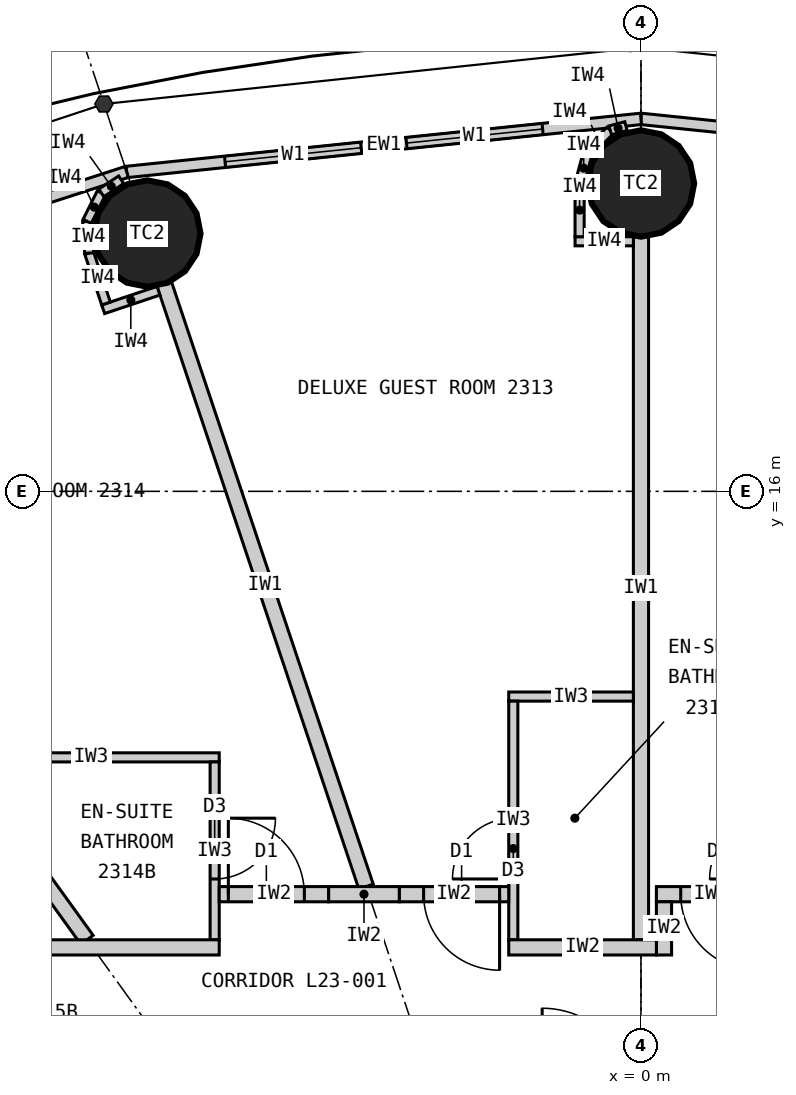
"""IFC4 building model, lengths in metres.
Left out: names, types, materials, properties, quantities, classifications, styles, units other than length and angle.
Written with IfcOpenShell. Run it as: python <this file> out.ifc"""

import sys

from ifc_helpers import new_model, si_unit, direction, frame, frame_2d, origin, origin_2d, place, context, subcontext, project, spatial, rectangle, circle, extrude, clip, halfspace, element, fill, save


model = new_model("IFC4")
c1 = context("Model", 3, precision=1e-05, world=origin(), true_north=direction((0.0, 1.0)))
c2 = subcontext(c1, "Body", "Model", "MODEL_VIEW")
j1 = project(units=[si_unit("LENGTHUNIT", "METRE"), si_unit("PLANEANGLEUNIT", "RADIAN")], contexts=[c1])
p1 = place(None, origin())
s1 = spatial("IfcSite", under=j1, at=p1, CompositionType="ELEMENT")
p2 = place(p1, origin())
s2 = spatial("IfcBuilding", under=s1, at=p2, CompositionType="ELEMENT")
p3 = place(p2, frame((0.0, 0.0, 90.3)))
s3 = spatial("IfcBuildingStorey", under=s2, at=p3, CompositionType="ELEMENT", Elevation=90.3)
for number, where, z_axis, x_axis in (
    (1, (0.0, 20.05, 0.0), (0.0, 0.0, 1.0), (1.0, 0.0, 0.0)),
    (2, (-6.495, 19.391, 0.0), (0.0, 0.0, 1.0), (1.0, 0.0, 0.0)),
):
    element("IfcColumn", number, at=place(p3, frame(where, z_axis=z_axis, x_axis=x_axis)), inside=s3, PredefinedType="COLUMN", context=c2, shape_type="Clipping", body=[
        clip(extrude(circle(Radius=0.7, at=origin_2d()), origin(), (0.0, 0.0, 1.0), 3.3), halfspace(frame((0.0, 0.0, 2.25), z_axis=(0.0, 0.0, 1.0), x_axis=(1.0, 0.0, 0.0)), False)),
    ])
p4 = place(p3, frame((6.766, 20.202, 0.0), z_axis=(0.0, 0.0, 1.0), x_axis=(-0.994721394369, 0.102612609291, 0.0)))
e3 = element("IfcWall", 3, at=p4, inside=s3, PredefinedType="ELEMENTEDWALL", context=c2, shape_type="SweptSolid", body=[
    extrude(rectangle(XDim=6.802, YDim=0.15, at=frame_2d((3.401, 0.0))), origin(), (0.0, 0.0, 1.0), 3.05),
])
p5 = place(p4, frame((1.301, 0.0, 0.9)))
e4 = element("IfcOpeningElement", 4, at=p5, cuts=e3, PredefinedType="OPENING", context=c2, shape_type="SweptSolid", body=[
    extrude(rectangle(XDim=1.8, YDim=1.9, at=frame_2d((0.9, 0.95))), frame((0.0, 0.085, 0.0), z_axis=(0.0, -1.0, 0.0), x_axis=(1.0, 0.0, 0.0)), (0.0, 0.0, 1.0), 0.17),
])
p6 = place(p4, frame((3.701, 0.0, 0.9)))
e5 = element("IfcOpeningElement", 5, at=p6, cuts=e3, PredefinedType="OPENING", context=c2, shape_type="SweptSolid", body=[
    extrude(rectangle(XDim=1.8, YDim=1.9, at=frame_2d((0.9, 0.95))), frame((0.0, 0.085, 0.0), z_axis=(0.0, -1.0, 0.0), x_axis=(1.0, 0.0, 0.0)), (0.0, 0.0, 1.0), 0.17),
])
p7 = place(p3, frame((0.0, 20.9, 0.0), z_axis=(0.0, 0.0, 1.0), x_axis=(-0.994721394369, -0.102612609291, 0.0)))
e6 = element("IfcWall", 6, at=p7, inside=s3, PredefinedType="ELEMENTEDWALL", context=c2, shape_type="SweptSolid", body=[
    extrude(rectangle(XDim=6.802, YDim=0.15, at=frame_2d((3.401, 0.0))), origin(), (0.0, 0.0, 1.0), 3.05),
])
p8 = place(p7, frame((1.301, 0.0, 0.9)))
e7 = element("IfcOpeningElement", 7, at=p8, cuts=e6, PredefinedType="OPENING", context=c2, shape_type="SweptSolid", body=[
    extrude(rectangle(XDim=1.8, YDim=1.9, at=frame_2d((0.9, 0.95))), frame((0.0, 0.085, 0.0), z_axis=(0.0, -1.0, 0.0), x_axis=(1.0, 0.0, 0.0)), (0.0, 0.0, 1.0), 0.17),
])
p9 = place(p7, frame((3.701, 0.0, 0.9)))
e8 = element("IfcOpeningElement", 8, at=p9, cuts=e6, PredefinedType="OPENING", context=c2, shape_type="SweptSolid", body=[
    extrude(rectangle(XDim=1.8, YDim=1.9, at=frame_2d((0.9, 0.95))), frame((0.0, 0.085, 0.0), z_axis=(0.0, -1.0, 0.0), x_axis=(1.0, 0.0, 0.0)), (0.0, 0.0, 1.0), 0.17),
])
p10 = place(p3, frame((-6.766, 20.202, 0.0), z_axis=(0.0, 0.0, 1.0), x_axis=(-0.951137534625, -0.308767534285, 0.0)))
e9 = element("IfcWall", 9, at=p10, inside=s3, PredefinedType="ELEMENTEDWALL", context=c2, shape_type="SweptSolid", body=[
    extrude(rectangle(XDim=6.655, YDim=0.15, at=frame_2d((3.328, 0.0))), origin(), (0.0, 0.0, 1.0), 3.05),
])
p11 = place(p10, frame((1.228, 0.0, 0.9)))
e10 = element("IfcOpeningElement", 10, at=p11, cuts=e9, PredefinedType="OPENING", context=c2, shape_type="SweptSolid", body=[
    extrude(rectangle(XDim=1.8, YDim=1.9, at=frame_2d((0.9, 0.95))), frame((0.0, 0.085, 0.0), z_axis=(0.0, -1.0, 0.0), x_axis=(1.0, 0.0, 0.0)), (0.0, 0.0, 1.0), 0.17),
])
p12 = place(p10, frame((3.628, 0.0, 0.9)))
e11 = element("IfcOpeningElement", 11, at=p12, cuts=e9, PredefinedType="OPENING", context=c2, shape_type="SweptSolid", body=[
    extrude(rectangle(XDim=1.8, YDim=1.9, at=frame_2d((0.9, 0.95))), frame((0.0, 0.085, 0.0), z_axis=(0.0, -1.0, 0.0), x_axis=(1.0, 0.0, 0.0)), (0.0, 0.0, 1.0), 0.17),
])
p13 = place(p3, frame((0.0, 10.1, 0.0), z_axis=(0.0, 0.0, 1.0), x_axis=(0.0, 1.0, 0.0)))
e12 = element("IfcWall", 12, at=p13, inside=s3, PredefinedType="PARTITIONING", context=c2, shape_type="SweptSolid", body=[
    extrude(rectangle(XDim=9.25, YDim=0.2, at=frame_2d((4.625, 0.0))), origin(), (0.0, 0.0, 1.0), 2.25),
])
p14 = place(p3, frame((-3.617, 10.8, 0.0), z_axis=(0.0, 0.0, 1.0), x_axis=(-0.317576599239, 0.948232621046, 0.0)))
e13 = element("IfcWall", 13, at=p14, inside=s3, PredefinedType="PARTITIONING", context=c2, shape_type="SweptSolid", body=[
    extrude(rectangle(XDim=8.36, YDim=0.2, at=frame_2d((4.18, 0.0))), origin(), (0.0, 0.0, 1.0), 2.15),
])
p15 = place(p3, frame((-7.289, 10.1, 0.0), z_axis=(0.0, 0.0, 1.0), x_axis=(-0.585198353053, 0.810890182197, 0.0)))
e14 = element("IfcWall", 14, at=p15, inside=s3, PredefinedType="PARTITIONING", context=c2, shape_type="SweptSolid", body=[
    extrude(rectangle(XDim=8.36, YDim=0.2, at=frame_2d((4.18, 0.0))), origin(), (0.0, 0.0, 1.0), 2.15),
])
p16 = place(p3, frame((-0.1, 13.3, 0.0), z_axis=(0.0, 0.0, 1.0), x_axis=(-1.0, 0.0, 0.0)))
e15 = element("IfcWall", 15, at=p16, inside=s3, PredefinedType="PARTITIONING", context=c2, shape_type="SweptSolid", body=[
    extrude(rectangle(XDim=1.64, YDim=0.12, at=frame_2d((0.82, 0.0))), origin(), (0.0, 0.0, 1.0), 3.05),
])
p17 = place(p3, frame((-1.68, 10.1, 0.0), z_axis=(0.0, 0.0, 1.0), x_axis=(0.0, 1.0, 0.0)))
e16 = element("IfcWall", 16, at=p17, inside=s3, PredefinedType="PARTITIONING", context=c2, shape_type="SweptSolid", body=[
    extrude(rectangle(XDim=3.14, YDim=0.12, at=frame_2d((1.57, 0.0))), origin(), (0.0, 0.0, 1.0), 3.05),
])
p18 = place(p17, frame((0.8, 0.0, 0.0)))
e17 = element("IfcOpeningElement", 17, at=p18, cuts=e16, PredefinedType="OPENING", context=c2, shape_type="SweptSolid", body=[
    extrude(rectangle(XDim=0.8, YDim=2.1, at=frame_2d((0.4, 1.05))), frame((0.0, 0.07, 0.0), z_axis=(0.0, -1.0, 0.0), x_axis=(1.0, 0.0, 0.0)), (0.0, 0.0, 1.0), 0.14),
])
p19 = place(p3, frame((-8.921, 12.5, 0.0), z_axis=(0.0, 0.0, 1.0), x_axis=(1.0, 0.0, 0.0)))
e18 = element("IfcWall", 18, at=p19, inside=s3, PredefinedType="PARTITIONING", context=c2, shape_type="SweptSolid", body=[
    extrude(rectangle(XDim=3.372, YDim=0.12, at=frame_2d((1.686, 0.0))), origin(), (0.0, 0.0, 1.0), 3.05),
])
p20 = place(p3, frame((-5.609, 10.1, 0.0), z_axis=(0.0, 0.0, 1.0), x_axis=(0.0, 1.0, 0.0)))
e19 = element("IfcWall", 19, at=p20, inside=s3, PredefinedType="PARTITIONING", context=c2, shape_type="SweptSolid", body=[
    extrude(rectangle(XDim=2.34, YDim=0.12, at=frame_2d((1.17, 0.0))), origin(), (0.0, 0.0, 1.0), 3.05),
])
p21 = place(p20, frame((0.8, 0.0, 0.0)))
e20 = element("IfcOpeningElement", 20, at=p21, cuts=e19, PredefinedType="OPENING", context=c2, shape_type="SweptSolid", body=[
    extrude(rectangle(XDim=0.8, YDim=2.1, at=frame_2d((0.4, 1.05))), frame((0.0, 0.07, 0.0), z_axis=(0.0, -1.0, 0.0), x_axis=(1.0, 0.0, 0.0)), (0.0, 0.0, 1.0), 0.14),
])
p22 = place(p3, frame((0.203, 10.7, 0.0), z_axis=(0.0, 0.0, 1.0), x_axis=(1.0, 0.0, 0.0)))
e21 = element("IfcWall", 21, at=p22, inside=s3, PredefinedType="PARTITIONING", context=c2, shape_type="SweptSolid", body=[
    extrude(rectangle(XDim=1.44, YDim=0.2, at=frame_2d((0.72, 0.0))), origin(), (0.0, 0.0, 1.0), 3.05),
])
p23 = place(p22, frame((0.32, 0.0, 0.0)))
e22 = element("IfcOpeningElement", 22, at=p23, cuts=e21, PredefinedType="OPENING", context=c2, shape_type="SweptSolid", body=[
    extrude(rectangle(XDim=1.0, YDim=2.2, at=frame_2d((0.5, 1.1))), frame((0.0, 0.11, 0.0), z_axis=(0.0, -1.0, 0.0), x_axis=(1.0, 0.0, 0.0)), (0.0, 0.0, 1.0), 0.22),
])
p24 = place(p3, frame((0.303, 9.9, 0.0), z_axis=(0.0, 0.0, 1.0), x_axis=(0.0, 1.0, 0.0)))
e23 = element("IfcWall", 23, at=p24, inside=s3, PredefinedType="PARTITIONING", context=c2, shape_type="SweptSolid", body=[
    extrude(rectangle(XDim=0.7, YDim=0.2, at=frame_2d((0.35, 0.0))), origin(), (0.0, 0.0, 1.0), 3.05),
])
p25 = place(p3, frame((-3.18, 10.7, 0.0), z_axis=(0.0, 0.0, 1.0), x_axis=(1.0, 0.0, 0.0)))
e24 = element("IfcWall", 24, at=p25, inside=s3, PredefinedType="PARTITIONING", context=c2, shape_type="SweptSolid", body=[
    extrude(rectangle(XDim=1.44, YDim=0.2, at=frame_2d((0.72, 0.0))), origin(), (0.0, 0.0, 1.0), 3.05),
])
p26 = place(p25, frame((0.32, 0.0, 0.0)))
e25 = element("IfcOpeningElement", 25, at=p26, cuts=e24, PredefinedType="OPENING", context=c2, shape_type="SweptSolid", body=[
    extrude(rectangle(XDim=1.0, YDim=2.2, at=frame_2d((0.5, 1.1))), frame((0.0, 0.11, 0.0), z_axis=(0.0, -1.0, 0.0), x_axis=(1.0, 0.0, 0.0)), (0.0, 0.0, 1.0), 0.22),
])
p27 = place(p3, frame((-5.549, 10.7, 0.0), z_axis=(0.0, 0.0, 1.0), x_axis=(1.0, 0.0, 0.0)))
e26 = element("IfcWall", 26, at=p27, inside=s3, PredefinedType="PARTITIONING", context=c2, shape_type="SweptSolid", body=[
    extrude(rectangle(XDim=1.44, YDim=0.2, at=frame_2d((0.72, 0.0))), origin(), (0.0, 0.0, 1.0), 3.05),
])
p28 = place(p27, frame((0.12, 0.0, 0.0)))
e27 = element("IfcOpeningElement", 27, at=p28, cuts=e26, PredefinedType="OPENING", context=c2, shape_type="SweptSolid", body=[
    extrude(rectangle(XDim=1.0, YDim=2.2, at=frame_2d((0.5, 1.1))), frame((0.0, 0.11, 0.0), z_axis=(0.0, -1.0, 0.0), x_axis=(1.0, 0.0, 0.0)), (0.0, 0.0, 1.0), 0.22),
])
p29 = place(p3, frame((-4.109, 10.7, 0.0), z_axis=(0.0, 0.0, 1.0), x_axis=(1.0, 0.0, 0.0)))
e28 = element("IfcWall", 28, at=p29, inside=s3, PredefinedType="PARTITIONING", context=c2, shape_type="SweptSolid", body=[
    extrude(rectangle(XDim=0.929, YDim=0.2, at=frame_2d((0.465, 0.0))), origin(), (0.0, 0.0, 1.0), 3.05),
])
p30 = place(p3, frame((-10.179, 10.0, 0.0), z_axis=(0.0, 0.0, 1.0), x_axis=(1.0, 0.0, 0.0)))
e29 = element("IfcWall", 29, at=p30, inside=s3, PredefinedType="PARTITIONING", context=c2, shape_type="SweptSolid", body=[
    extrude(rectangle(XDim=4.63, YDim=0.2, at=frame_2d((2.315, 0.0))), origin(), (0.0, 0.0, 1.0), 3.05),
])
p31 = place(p3, frame((-1.74, 10.0, 0.0), z_axis=(0.0, 0.0, 1.0), x_axis=(1.0, 0.0, 0.0)))
e30 = element("IfcWall", 30, at=p31, inside=s3, PredefinedType="PARTITIONING", context=c2, shape_type="SweptSolid", body=[
    extrude(rectangle(XDim=1.943, YDim=0.2, at=frame_2d((0.971, 0.0))), origin(), (0.0, 0.0, 1.0), 3.05),
])
p32 = place(p3, frame((-0.1, 19.29, 0.0), z_axis=(0.0, 0.0, 1.0), x_axis=(-1.0, 0.0, 0.0)))
e31 = element("IfcWall", 31, at=p32, inside=s3, PredefinedType="PARTITIONING", context=c2, shape_type="SweptSolid", body=[
    extrude(rectangle(XDim=0.767, YDim=0.12, at=frame_2d((0.384, 0.0))), origin(), (0.0, 0.0, 1.0), 3.05),
])
p33 = place(p3, frame((-0.808, 19.35, 0.0), z_axis=(0.0, 0.0, 1.0), x_axis=(0.0, 1.0, 0.0)))
e32 = element("IfcWall", 32, at=p33, inside=s3, PredefinedType="PARTITIONING", context=c2, shape_type="SweptSolid", body=[
    extrude(rectangle(XDim=0.7, YDim=0.12, at=frame_2d((0.35, 0.0))), origin(), (0.0, 0.0, 1.0), 3.05),
])
p34 = place(p3, frame((-0.808, 20.05, 0.0), z_axis=(0.0, 0.0, 1.0), x_axis=(0.2592614205, 0.965807183573, 0.0)))
e33 = element("IfcWall", 33, at=p34, inside=s3, PredefinedType="PARTITIONING", context=c2, shape_type="SweptSolid", body=[
    extrude(rectangle(XDim=0.418, YDim=0.12, at=frame_2d((0.209, 0.0))), origin(), (0.0, 0.0, 1.0), 3.05),
])
p35 = place(p3, frame((-0.699, 20.454, 0.0), z_axis=(0.0, 0.0, 1.0), x_axis=(0.707106781187, 0.707106781187, 0.0)))
e34 = element("IfcWall", 34, at=p35, inside=s3, PredefinedType="PARTITIONING", context=c2, shape_type="SweptSolid", body=[
    extrude(rectangle(XDim=0.418, YDim=0.12, at=frame_2d((0.209, 0.0))), origin(), (0.0, 0.0, 1.0), 3.05),
])
p36 = place(p3, frame((-0.404, 20.749, 0.0), z_axis=(0.0, 0.0, 1.0), x_axis=(0.965759066438, 0.25944060128, 0.0)))
e35 = element("IfcWall", 35, at=p36, inside=s3, PredefinedType="PARTITIONING", context=c2, shape_type="SweptSolid", body=[
    extrude(rectangle(XDim=0.214, YDim=0.12, at=frame_2d((0.107, 0.0))), origin(), (0.0, 0.0, 1.0), 3.05),
])
p37 = place(p3, frame((-6.348, 18.639, 0.0), z_axis=(0.0, 0.0, 1.0), x_axis=(-0.948268951266, -0.317468102437, 0.0)))
e36 = element("IfcWall", 36, at=p37, inside=s3, PredefinedType="PARTITIONING", context=c2, shape_type="SweptSolid", body=[
    extrude(rectangle(XDim=0.768, YDim=0.12, at=frame_2d((0.384, 0.0))), origin(), (0.0, 0.0, 1.0), 3.05),
])
p38 = place(p3, frame((-7.038, 18.471, 0.0), z_axis=(0.0, 0.0, 1.0), x_axis=(-0.317378466199, 0.9482989556, 0.0)))
e37 = element("IfcWall", 37, at=p38, inside=s3, PredefinedType="PARTITIONING", context=c2, shape_type="SweptSolid", body=[
    extrude(rectangle(XDim=0.7, YDim=0.12, at=frame_2d((0.35, 0.0))), origin(), (0.0, 0.0, 1.0), 3.05),
])
p39 = place(p3, frame((-7.26, 19.135, 0.0), z_axis=(0.0, 0.0, 1.0), x_axis=(-0.0613238046, 0.99811792439, 0.0)))
e38 = element("IfcWall", 38, at=p39, inside=s3, PredefinedType="PARTITIONING", context=c2, shape_type="SweptSolid", body=[
    extrude(rectangle(XDim=0.418, YDim=0.12, at=frame_2d((0.209, 0.0))), origin(), (0.0, 0.0, 1.0), 3.05),
])
p40 = place(p3, frame((-7.286, 19.552, 0.0), z_axis=(0.0, 0.0, 1.0), x_axis=(0.445810757773, 0.89512723579, 0.0)))
e39 = element("IfcWall", 39, at=p40, inside=s3, PredefinedType="PARTITIONING", context=c2, shape_type="SweptSolid", body=[
    extrude(rectangle(XDim=0.418, YDim=0.12, at=frame_2d((0.209, 0.0))), origin(), (0.0, 0.0, 1.0), 3.05),
])
p41 = place(p3, frame((-7.1, 19.926, 0.0), z_axis=(0.0, 0.0, 1.0), x_axis=(0.833488262509, 0.552537162787, 0.0)))
e40 = element("IfcWall", 40, at=p41, inside=s3, PredefinedType="PARTITIONING", context=c2, shape_type="SweptSolid", body=[
    extrude(rectangle(XDim=0.313, YDim=0.12, at=frame_2d((0.156, 0.0))), origin(), (0.0, 0.0, 1.0), 3.05),
])
p42 = place(p8, origin())
e41 = element("IfcWindow", 41, at=p42, inside=s3, PartitioningType="SINGLE_PANEL", PredefinedType="WINDOW", context=c2, shape_type="SweptSolid", body=[
    extrude(rectangle(XDim=1.8, YDim=1.9, at=frame_2d((0.9, 0.95))), frame((0.0, 0.03, 0.0), z_axis=(0.0, -1.0, 0.0), x_axis=(1.0, 0.0, 0.0)), (0.0, 0.0, 1.0), 0.06),
])
fill(e7, e41)
p43 = place(p9, origin())
e42 = element("IfcWindow", 42, at=p43, inside=s3, PartitioningType="SINGLE_PANEL", PredefinedType="WINDOW", context=c2, shape_type="SweptSolid", body=[
    extrude(rectangle(XDim=1.8, YDim=1.9, at=frame_2d((0.9, 0.95))), frame((0.0, 0.03, 0.0), z_axis=(0.0, -1.0, 0.0), x_axis=(1.0, 0.0, 0.0)), (0.0, 0.0, 1.0), 0.06),
])
fill(e8, e42)
p44 = place(p23, origin())
e43 = element("IfcDoor", 43, at=p44, inside=s3, OperationType="SINGLE_SWING_RIGHT", PredefinedType="DOOR", context=c2, shape_type="SweptSolid", body=[
    extrude(rectangle(XDim=1.0, YDim=2.2, at=frame_2d((0.5, 1.1))), frame((0.0, 0.025, 0.0), z_axis=(0.0, -1.0, 0.0), x_axis=(1.0, 0.0, 0.0)), (0.0, 0.0, 1.0), 0.05),
])
fill(e22, e43)
p45 = place(p18, origin())
e44 = element("IfcDoor", 44, at=p45, inside=s3, OperationType="SINGLE_SWING_LEFT", PredefinedType="DOOR", context=c2, shape_type="SweptSolid", body=[
    extrude(rectangle(XDim=0.8, YDim=2.1, at=frame_2d((0.4, 1.05))), frame((0.0, 0.025, 0.0), z_axis=(0.0, -1.0, 0.0), x_axis=(1.0, 0.0, 0.0)), (0.0, 0.0, 1.0), 0.05),
])
fill(e17, e44)
p46 = place(p26, origin())
e45 = element("IfcDoor", 45, at=p46, inside=s3, OperationType="SINGLE_SWING_RIGHT", PredefinedType="DOOR", context=c2, shape_type="SweptSolid", body=[
    extrude(rectangle(XDim=1.0, YDim=2.2, at=frame_2d((0.5, 1.1))), frame((0.0, 0.025, 0.0), z_axis=(0.0, -1.0, 0.0), x_axis=(1.0, 0.0, 0.0)), (0.0, 0.0, 1.0), 0.05),
])
fill(e25, e45)
p47 = place(p21, origin())
e46 = element("IfcDoor", 46, at=p47, inside=s3, OperationType="SINGLE_SWING_RIGHT", PredefinedType="DOOR", context=c2, shape_type="SweptSolid", body=[
    extrude(rectangle(XDim=0.8, YDim=2.1, at=frame_2d((0.4, 1.05))), frame((0.0, 0.025, 0.0), z_axis=(0.0, -1.0, 0.0), x_axis=(1.0, 0.0, 0.0)), (0.0, 0.0, 1.0), 0.05),
])
fill(e20, e46)
p48 = place(p28, origin())
e47 = element("IfcDoor", 47, at=p48, inside=s3, OperationType="SINGLE_SWING_LEFT", PredefinedType="DOOR", context=c2, shape_type="SweptSolid", body=[
    extrude(rectangle(XDim=1.0, YDim=2.2, at=frame_2d((0.5, 1.1))), frame((0.0, 0.025, 0.0), z_axis=(0.0, -1.0, 0.0), x_axis=(1.0, 0.0, 0.0)), (0.0, 0.0, 1.0), 0.05),
])
fill(e27, e47)
save(model, sys.argv[1])
